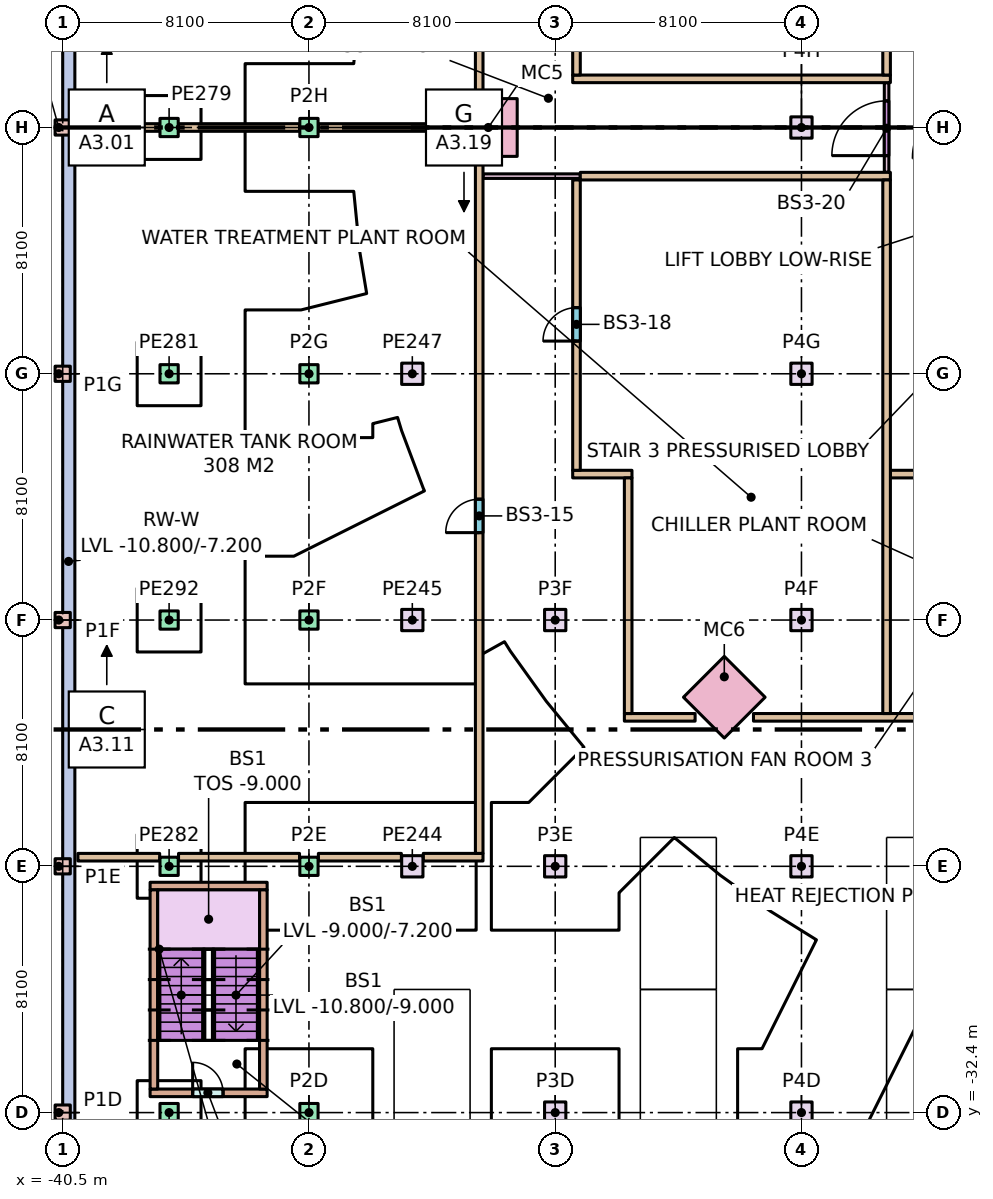
"""IFC4 building model, lengths in metres.
Left out: names, types, materials, properties, quantities, classifications, styles, units other than length and angle.
Written with IfcOpenShell. Run it as: python <this file> out.ifc"""

import sys

from ifc_helpers import new_model, si_unit, direction, frame, frame_2d, origin, origin_2d, place, context, subcontext, project, spatial, rectangle, extrude, element, fill, save


model = new_model("IFC4")
c1 = context("Model", 3, precision=1e-05, world=origin(), true_north=direction((0.0, 1.0)))
c2 = subcontext(c1, "Body", "Model", "MODEL_VIEW")
j1 = project(units=[si_unit("LENGTHUNIT", "METRE"), si_unit("PLANEANGLEUNIT", "RADIAN")], contexts=[c1])
p1 = place(None, origin())
s1 = spatial("IfcSite", under=j1, at=p1, CompositionType="ELEMENT")
p2 = place(p1, origin())
s2 = spatial("IfcBuilding", under=s1, at=p2, CompositionType="ELEMENT")
p3 = place(p2, frame((0.0, 0.0, -10.8)))
s3 = spatial("IfcBuildingStorey", under=s2, at=p3, CompositionType="ELEMENT", Elevation=-10.8)
p4 = place(p3, frame((-40.3, -56.3, 0.0), z_axis=(0.0, 0.0, 1.0), x_axis=(0.0, 1.0, 0.0)))
e1 = element("IfcWall", 1, at=p4, inside=s3, PredefinedType="SOLIDWALL", context=c2, shape_type="SweptSolid", body=[
    extrude(rectangle(XDim=112.6, YDim=0.4, at=frame_2d((56.3, 0.0))), origin(), (0.0, 0.0, 1.0), 3.6),
])
for number, where, z_axis, x_axis in (
    (2, (-40.5, -32.4, 0.0), (0.0, 0.0, 1.0), (1.0, 0.0, 0.0)),
    (3, (-40.5, -24.3, 0.0), (0.0, 0.0, 1.0), (1.0, 0.0, 0.0)),
    (4, (-40.5, -16.2, 0.0), (0.0, 0.0, 1.0), (1.0, 0.0, 0.0)),
    (5, (-40.5, -8.1, 0.0), (0.0, 0.0, 1.0), (1.0, 0.0, 0.0)),
    (6, (-40.5, 0.0, 0.0), (0.0, 0.0, 1.0), (1.0, 0.0, 0.0)),
):
    element("IfcColumn", number, at=place(p3, frame(where, z_axis=z_axis, x_axis=x_axis)), inside=s3, PredefinedType="COLUMN", context=c2, shape_type="SweptSolid", body=[
        extrude(rectangle(XDim=0.5, YDim=0.5, at=origin_2d()), origin(), (0.0, 0.0, 1.0), 3.6),
    ])
for number, where, z_axis, x_axis in (
    (7, (-32.4, -32.4, 0.0), (0.0, 0.0, 1.0), (1.0, 0.0, 0.0)),
    (8, (-32.4, -24.3, 0.0), (0.0, 0.0, 1.0), (1.0, 0.0, 0.0)),
    (9, (-32.4, -16.2, 0.0), (0.0, 0.0, 1.0), (1.0, 0.0, 0.0)),
    (10, (-32.4, -8.1, 0.0), (0.0, 0.0, 1.0), (1.0, 0.0, 0.0)),
    (11, (-32.4, 0.0, 0.0), (0.0, 0.0, 1.0), (1.0, 0.0, 0.0)),
):
    element("IfcColumn", number, at=place(p3, frame(where, z_axis=z_axis, x_axis=x_axis)), inside=s3, PredefinedType="COLUMN", context=c2, shape_type="SweptSolid", body=[
        extrude(rectangle(XDim=0.6, YDim=0.6, at=origin_2d()), origin(), (0.0, 0.0, 1.0), 3.6),
    ])
for number, where, z_axis, x_axis in (
    (12, (-24.3, -32.4, 0.0), (0.0, 0.0, 1.0), (1.0, 0.0, 0.0)),
    (13, (-24.3, -24.3, 0.0), (0.0, 0.0, 1.0), (1.0, 0.0, 0.0)),
    (14, (-24.3, -16.2, 0.0), (0.0, 0.0, 1.0), (1.0, 0.0, 0.0)),
    (15, (-16.2, -32.4, 0.0), (0.0, 0.0, 1.0), (1.0, 0.0, 0.0)),
    (16, (-16.2, -24.3, 0.0), (0.0, 0.0, 1.0), (1.0, 0.0, 0.0)),
    (17, (-16.2, -16.2, 0.0), (0.0, 0.0, 1.0), (1.0, 0.0, 0.0)),
    (18, (-16.2, -8.1, 0.0), (0.0, 0.0, 1.0), (1.0, 0.0, 0.0)),
    (19, (-16.2, 0.0, 0.0), (0.0, 0.0, 1.0), (1.0, 0.0, 0.0)),
    (20, (-29.0, -24.3, 0.0), (0.0, 0.0, 1.0), (1.0, 0.0, 0.0)),
    (21, (-29.0, -16.2, 0.0), (0.0, 0.0, 1.0), (1.0, 0.0, 0.0)),
    (22, (-29.0, -8.1, 0.0), (0.0, 0.0, 1.0), (1.0, 0.0, 0.0)),
):
    element("IfcColumn", number, at=place(p3, frame(where, z_axis=z_axis, x_axis=x_axis)), inside=s3, PredefinedType="COLUMN", context=c2, shape_type="SweptSolid", body=[
        extrude(rectangle(XDim=0.7, YDim=0.7, at=origin_2d()), origin(), (0.0, 0.0, 1.0), 3.6),
    ])
for number, where, z_axis, x_axis in (
    (23, (-37.0, 0.0, 0.0), (0.0, 0.0, 1.0), (1.0, 0.0, 0.0)),
    (24, (-37.0, -32.4, 0.0), (0.0, 0.0, 1.0), (1.0, 0.0, 0.0)),
    (25, (-37.0, -8.1, 0.0), (0.0, 0.0, 1.0), (1.0, 0.0, 0.0)),
    (26, (-37.0, -24.3, 0.0), (0.0, 0.0, 1.0), (1.0, 0.0, 0.0)),
    (27, (-37.0, -16.2, 0.0), (0.0, 0.0, 1.0), (1.0, 0.0, 0.0)),
):
    element("IfcColumn", number, at=place(p3, frame(where, z_axis=z_axis, x_axis=x_axis)), inside=s3, PredefinedType="COLUMN", context=c2, shape_type="SweptSolid", body=[
        extrude(rectangle(XDim=0.6, YDim=0.6, at=origin_2d()), origin(), (0.0, 0.0, 1.0), 3.6),
    ])
for number, where, z_axis, x_axis in (
    (28, (-26.5, 0.0, 0.0), (0.0, 0.0, 1.0), (0.0, -1.0, 0.0)),
    (29, (-18.738, -18.738, 0.0), (0.0, 0.0, 1.0), (0.707, -0.707, 0.0)),
):
    element("IfcColumn", number, at=place(p3, frame(where, z_axis=z_axis, x_axis=x_axis)), inside=s3, PredefinedType="COLUMN", context=c2, shape_type="SweptSolid", body=[
        extrude(rectangle(XDim=1.9, YDim=1.9, at=origin_2d()), origin(), (0.0, 0.0, 1.0), 3.6),
    ])
p5 = place(p3, frame((-37.625, -31.75, 0.0), z_axis=(0.0, 0.0, 1.0), x_axis=(1.0, 0.0, 0.0)))
e30 = element("IfcWall", 30, at=p5, inside=s3, PredefinedType="STANDARD", context=c2, shape_type="SweptSolid", body=[
    extrude(rectangle(XDim=3.85, YDim=0.25, at=frame_2d((1.925, 0.0))), origin(), (0.0, 0.0, 1.0), 3.28),
])
p6 = place(p5, frame((1.4, 0.0, 0.0)))
e31 = element("IfcOpeningElement", 31, at=p6, cuts=e30, PredefinedType="OPENING", context=c2, shape_type="SweptSolid", body=[
    extrude(rectangle(XDim=1.0, YDim=2.1, at=frame_2d((0.5, 1.05))), frame((0.0, 0.135, 0.0), z_axis=(0.0, -1.0, 0.0), x_axis=(1.0, 0.0, 0.0)), (0.0, 0.0, 1.0), 0.27),
])
p7 = place(p3, frame((-37.625, -24.95, 0.0), z_axis=(0.0, 0.0, 1.0), x_axis=(1.0, 0.0, 0.0)))
e32 = element("IfcWall", 32, at=p7, inside=s3, PredefinedType="STANDARD", context=c2, shape_type="SweptSolid", body=[
    extrude(rectangle(XDim=3.85, YDim=0.25, at=frame_2d((1.925, 0.0))), origin(), (0.0, 0.0, 1.0), 3.28),
])
for number, where, z_axis, x_axis in (
    (33, (-37.5, -31.625, 0.0), (0.0, 0.0, 1.0), (0.0, 1.0, 0.0)),
    (34, (-33.9, -31.625, 0.0), (0.0, 0.0, 1.0), (0.0, 1.0, 0.0)),
):
    element("IfcWall", number, at=place(p3, frame(where, z_axis=z_axis, x_axis=x_axis)), inside=s3, PredefinedType="STANDARD", context=c2, shape_type="SweptSolid", body=[
        extrude(rectangle(XDim=6.55, YDim=0.25, at=frame_2d((3.275, 0.0))), origin(), (0.0, 0.0, 1.0), 3.28),
    ])
p8 = place(p3, frame((-26.675, -1.6, 0.0), z_axis=(0.0, 0.0, 1.0), x_axis=(1.0, 0.0, 0.0)))
e35 = element("IfcWall", 35, at=p8, inside=s3, PredefinedType="PARTITIONING", context=c2, shape_type="SweptSolid", body=[
    extrude(rectangle(XDim=3.2, YDim=0.15, at=frame_2d((1.6, 0.0))), origin(), (0.0, 0.0, 1.0), 3.28),
])
p9 = place(p3, frame((-40.0, -24.0, 0.0), z_axis=(0.0, 0.0, 1.0), x_axis=(1.0, 0.0, 0.0)))
e36 = element("IfcWall", 36, at=p9, inside=s3, PredefinedType="PARTITIONING", context=c2, shape_type="SweptSolid", body=[
    extrude(rectangle(XDim=2.69, YDim=0.25, at=frame_2d((1.345, 0.0))), origin(), (0.0, 0.0, 1.0), 3.28),
])
p10 = place(p3, frame((-36.69, -24.0, 0.0), z_axis=(0.0, 0.0, 1.0), x_axis=(1.0, 0.0, 0.0)))
e37 = element("IfcWall", 37, at=p10, inside=s3, PredefinedType="PARTITIONING", context=c2, shape_type="SweptSolid", body=[
    extrude(rectangle(XDim=3.98, YDim=0.25, at=frame_2d((1.99, 0.0))), origin(), (0.0, 0.0, 1.0), 3.28),
])
p11 = place(p3, frame((-32.09, -24.0, 0.0), z_axis=(0.0, 0.0, 1.0), x_axis=(1.0, 0.0, 0.0)))
e38 = element("IfcWall", 38, at=p11, inside=s3, PredefinedType="PARTITIONING", context=c2, shape_type="SweptSolid", body=[
    extrude(rectangle(XDim=2.73, YDim=0.25, at=frame_2d((1.365, 0.0))), origin(), (0.0, 0.0, 1.0), 3.28),
])
p12 = place(p3, frame((-28.64, -24.0, 0.0), z_axis=(0.0, 0.0, 1.0), x_axis=(1.0, 0.0, 0.0)))
e39 = element("IfcWall", 39, at=p12, inside=s3, PredefinedType="PARTITIONING", context=c2, shape_type="SweptSolid", body=[
    extrude(rectangle(XDim=1.965, YDim=0.25, at=frame_2d((0.982, 0.0))), origin(), (0.0, 0.0, 1.0), 3.28),
])
p13 = place(p3, frame((-26.8, -23.875, 0.0), z_axis=(0.0, 0.0, 1.0), x_axis=(0.0, 1.0, 0.0)))
e40 = element("IfcWall", 40, at=p13, inside=s3, PredefinedType="PARTITIONING", context=c2, shape_type="SweptSolid", body=[
    extrude(rectangle(XDim=22.915, YDim=0.25, at=frame_2d((11.458, 0.0))), origin(), (0.0, 0.0, 1.0), 3.28),
])
p14 = place(p13, frame((10.55, 0.0, 0.0)))
e41 = element("IfcOpeningElement", 41, at=p14, cuts=e40, PredefinedType="OPENING", context=c2, shape_type="SweptSolid", body=[
    extrude(rectangle(XDim=1.1, YDim=2.1, at=frame_2d((0.55, 1.05))), frame((0.0, 0.135, 0.0), z_axis=(0.0, -1.0, 0.0), x_axis=(1.0, 0.0, 0.0)), (0.0, 0.0, 1.0), 0.27),
])
p15 = place(p3, frame((-22.025, -19.4, 0.0), z_axis=(0.0, 0.0, 1.0), x_axis=(1.0, 0.0, 0.0)))
e42 = element("IfcWall", 42, at=p15, inside=s3, PredefinedType="PARTITIONING", context=c2, shape_type="SweptSolid", body=[
    extrude(rectangle(XDim=2.327, YDim=0.25, at=frame_2d((1.163, 0.0))), origin(), (0.0, 0.0, 1.0), 3.28),
])
p16 = place(p3, frame((-17.778, -19.4, 0.0), z_axis=(0.0, 0.0, 1.0), x_axis=(1.0, 0.0, 0.0)))
e43 = element("IfcWall", 43, at=p16, inside=s3, PredefinedType="PARTITIONING", context=c2, shape_type="SweptSolid", body=[
    extrude(rectangle(XDim=35.557, YDim=0.25, at=frame_2d((17.778, 0.0))), origin(), (0.0, 0.0, 1.0), 3.28),
])
p17 = place(p16, frame((9.353, 0.0, 0.0)))
e44 = element("IfcOpeningElement", 44, at=p17, cuts=e43, PredefinedType="OPENING", context=c2, shape_type="SweptSolid", body=[
    extrude(rectangle(XDim=1.1, YDim=2.1, at=frame_2d((0.55, 1.05))), frame((0.0, 0.135, 0.0), z_axis=(0.0, -1.0, 0.0), x_axis=(1.0, 0.0, 0.0)), (0.0, 0.0, 1.0), 0.27),
])
p18 = place(p16, frame((17.373, 0.0, 0.0)))
e45 = element("IfcOpeningElement", 45, at=p18, cuts=e43, PredefinedType="OPENING", context=c2, shape_type="SweptSolid", body=[
    extrude(rectangle(XDim=1.1, YDim=2.1, at=frame_2d((0.55, 1.05))), frame((0.0, 0.135, 0.0), z_axis=(0.0, -1.0, 0.0), x_axis=(1.0, 0.0, 0.0)), (0.0, 0.0, 1.0), 0.27),
])
p19 = place(p16, frame((23.633, 0.0, 0.0)))
e46 = element("IfcOpeningElement", 46, at=p19, cuts=e43, PredefinedType="OPENING", context=c2, shape_type="SweptSolid", body=[
    extrude(rectangle(XDim=1.1, YDim=2.1, at=frame_2d((0.55, 1.05))), frame((0.0, 0.135, 0.0), z_axis=(0.0, -1.0, 0.0), x_axis=(1.0, 0.0, 0.0)), (0.0, 0.0, 1.0), 0.27),
])
p20 = place(p16, frame((31.08, 0.0, 0.0)))
e47 = element("IfcOpeningElement", 47, at=p20, cuts=e43, PredefinedType="OPENING", context=c2, shape_type="SweptSolid", body=[
    extrude(rectangle(XDim=1.1, YDim=2.1, at=frame_2d((0.55, 1.05))), frame((0.0, 0.135, 0.0), z_axis=(0.0, -1.0, 0.0), x_axis=(1.0, 0.0, 0.0)), (0.0, 0.0, 1.0), 0.27),
])
p21 = place(p3, frame((-23.725, -11.4, 0.0), z_axis=(0.0, 0.0, 1.0), x_axis=(1.0, 0.0, 0.0)))
e48 = element("IfcWall", 48, at=p21, inside=s3, PredefinedType="PARTITIONING", context=c2, shape_type="SweptSolid", body=[
    extrude(rectangle(XDim=1.95, YDim=0.25, at=frame_2d((0.975, 0.0))), origin(), (0.0, 0.0, 1.0), 3.28),
])
p22 = place(p3, frame((-23.6, -11.275, 0.0), z_axis=(0.0, 0.0, 1.0), x_axis=(0.0, 1.0, 0.0)))
e49 = element("IfcWall", 49, at=p22, inside=s3, PredefinedType="PARTITIONING", context=c2, shape_type="SweptSolid", body=[
    extrude(rectangle(XDim=9.55, YDim=0.25, at=frame_2d((4.775, 0.0))), origin(), (0.0, 0.0, 1.0), 3.28),
])
p23 = place(p22, frame((4.25, 0.0, 0.0)))
e50 = element("IfcOpeningElement", 50, at=p23, cuts=e49, PredefinedType="OPENING", context=c2, shape_type="SweptSolid", body=[
    extrude(rectangle(XDim=1.1, YDim=2.1, at=frame_2d((0.55, 1.05))), frame((0.0, 0.135, 0.0), z_axis=(0.0, -1.0, 0.0), x_axis=(1.0, 0.0, 0.0)), (0.0, 0.0, 1.0), 0.27),
])
p24 = place(p3, frame((-21.9, -19.275, 0.0), z_axis=(0.0, 0.0, 1.0), x_axis=(0.0, 1.0, 0.0)))
e51 = element("IfcWall", 51, at=p24, inside=s3, PredefinedType="PARTITIONING", context=c2, shape_type="SweptSolid", body=[
    extrude(rectangle(XDim=7.75, YDim=0.25, at=frame_2d((3.875, 0.0))), origin(), (0.0, 0.0, 1.0), 3.28),
])
p25 = place(p3, frame((-13.4, -1.475, 0.0), z_axis=(0.0, 0.0, 1.0), x_axis=(0.0, 1.0, 0.0)))
e52 = element("IfcWall", 52, at=p25, inside=s3, PredefinedType="PARTITIONING", context=c2, shape_type="SweptSolid", body=[
    extrude(rectangle(XDim=2.95, YDim=0.15, at=frame_2d((1.475, 0.0))), origin(), (0.0, 0.0, 1.0), 3.28),
])
p26 = place(p25, frame((0.55, 0.0, 0.0)))
e53 = element("IfcOpeningElement", 53, at=p26, cuts=e52, PredefinedType="OPENING", context=c2, shape_type="SweptSolid", body=[
    extrude(rectangle(XDim=1.8, YDim=2.4, at=frame_2d((0.9, 1.2))), frame((0.0, 0.085, 0.0), z_axis=(0.0, -1.0, 0.0), x_axis=(1.0, 0.0, 0.0)), (0.0, 0.0, 1.0), 0.17),
])
p27 = place(p3, frame((-26.8, 0.96, 0.0), z_axis=(0.0, 0.0, 1.0), x_axis=(0.0, 1.0, 0.0)))
e54 = element("IfcWall", 54, at=p27, inside=s3, PredefinedType="PARTITIONING", context=c2, shape_type="SweptSolid", body=[
    extrude(rectangle(XDim=22.915, YDim=0.25, at=frame_2d((11.458, 0.0))), origin(), (0.0, 0.0, 1.0), 3.28),
])
p28 = place(p27, frame((11.19, 0.0, 0.0)))
e55 = element("IfcOpeningElement", 55, at=p28, cuts=e54, PredefinedType="OPENING", context=c2, shape_type="SweptSolid", body=[
    extrude(rectangle(XDim=1.1, YDim=2.1, at=frame_2d((0.55, 1.05))), frame((0.0, 0.135, 0.0), z_axis=(0.0, -1.0, 0.0), x_axis=(1.0, 0.0, 0.0)), (0.0, 0.0, 1.0), 0.27),
])
p29 = place(p3, frame((-23.725, 1.6, 0.0), z_axis=(0.0, 0.0, 1.0), x_axis=(1.0, 0.0, 0.0)))
e56 = element("IfcWall", 56, at=p29, inside=s3, PredefinedType="PARTITIONING", context=c2, shape_type="SweptSolid", body=[
    extrude(rectangle(XDim=10.45, YDim=0.25, at=frame_2d((5.225, 0.0))), origin(), (0.0, 0.0, 1.0), 3.28),
])
p30 = place(p3, frame((-23.475, -1.6, 0.0), z_axis=(0.0, 0.0, 1.0), x_axis=(1.0, 0.0, 0.0)))
e57 = element("IfcWall", 57, at=p30, inside=s3, PredefinedType="PARTITIONING", context=c2, shape_type="SweptSolid", body=[
    extrude(rectangle(XDim=10.2, YDim=0.25, at=frame_2d((5.1, 0.0))), origin(), (0.0, 0.0, 1.0), 3.28),
])
p31 = place(p3, frame((-23.6, 1.725, 0.0), z_axis=(0.0, 0.0, 1.0), x_axis=(0.0, 1.0, 0.0)))
e58 = element("IfcWall", 58, at=p31, inside=s3, PredefinedType="PARTITIONING", context=c2, shape_type="SweptSolid", body=[
    extrude(rectangle(XDim=9.55, YDim=0.25, at=frame_2d((4.775, 0.0))), origin(), (0.0, 0.0, 1.0), 3.28),
])
p32 = place(p3, frame((-13.275, -11.4, 0.0), z_axis=(0.0, 0.0, 1.0), x_axis=(1.0, 0.0, 0.0)))
e59 = element("IfcWall", 59, at=p32, inside=s3, PredefinedType="PARTITIONING", context=c2, shape_type="SweptSolid", body=[
    extrude(rectangle(XDim=34.55, YDim=0.25, at=frame_2d((17.275, 0.0))), origin(), (0.0, 0.0, 1.0), 3.28),
])
for number, where, z_axis, x_axis in (
    (60, (-13.4, 1.725, 0.0), (0.0, 0.0, 1.0), (0.0, 1.0, 0.0)),
    (61, (-13.4, -19.275, 0.0), (0.0, 0.0, 1.0), (0.0, 1.0, 0.0)),
):
    element("IfcWall", number, at=place(p3, frame(where, z_axis=z_axis, x_axis=x_axis)), inside=s3, PredefinedType="PARTITIONING", context=c2, shape_type="SweptSolid", body=[
        extrude(rectangle(XDim=17.55, YDim=0.25, at=frame_2d((8.775, 0.0))), origin(), (0.0, 0.0, 1.0), 3.28),
    ])
p33 = place(p3, frame((-40.0, 0.0, 0.0), z_axis=(0.0, 0.0, 1.0), x_axis=(1.0, 0.0, 0.0)))
e62 = element("IfcWall", 62, at=p33, inside=s3, PredefinedType="PARTITIONING", context=c2, shape_type="SweptSolid", body=[
    extrude(rectangle(XDim=2.69, YDim=0.25, at=frame_2d((1.345, 0.0))), origin(), (0.0, 0.0, 1.0), 3.28),
])
p34 = place(p3, frame((-36.69, 0.0, 0.0), z_axis=(0.0, 0.0, 1.0), x_axis=(1.0, 0.0, 0.0)))
e63 = element("IfcWall", 63, at=p34, inside=s3, PredefinedType="PARTITIONING", context=c2, shape_type="SweptSolid", body=[
    extrude(rectangle(XDim=3.98, YDim=0.25, at=frame_2d((1.99, 0.0))), origin(), (0.0, 0.0, 1.0), 3.28),
])
p35 = place(p3, frame((-32.09, 0.0, 0.0), z_axis=(0.0, 0.0, 1.0), x_axis=(1.0, 0.0, 0.0)))
e64 = element("IfcWall", 64, at=p35, inside=s3, PredefinedType="PARTITIONING", context=c2, shape_type="SweptSolid", body=[
    extrude(rectangle(XDim=4.63, YDim=0.25, at=frame_2d((2.315, 0.0))), origin(), (0.0, 0.0, 1.0), 3.28),
])
p36 = place(p6, origin())
e65 = element("IfcDoor", 65, at=p36, inside=s3, OperationType="SINGLE_SWING_LEFT", PredefinedType="DOOR", context=c2, shape_type="SweptSolid", body=[
    extrude(rectangle(XDim=1.0, YDim=2.1, at=frame_2d((0.5, 1.05))), frame((0.0, 0.025, 0.0), z_axis=(0.0, -1.0, 0.0), x_axis=(1.0, 0.0, 0.0)), (0.0, 0.0, 1.0), 0.05),
])
fill(e31, e65)
p37 = place(p14, origin())
e66 = element("IfcDoor", 66, at=p37, inside=s3, OperationType="SINGLE_SWING_LEFT", PredefinedType="DOOR", context=c2, shape_type="SweptSolid", body=[
    extrude(rectangle(XDim=1.1, YDim=2.1, at=frame_2d((0.55, 1.05))), frame((0.0, 0.025, 0.0), z_axis=(0.0, -1.0, 0.0), x_axis=(1.0, 0.0, 0.0)), (0.0, 0.0, 1.0), 0.05),
])
fill(e41, e66)
p38 = place(p23, origin())
e67 = element("IfcDoor", 67, at=p38, inside=s3, OperationType="SINGLE_SWING_LEFT", PredefinedType="DOOR", context=c2, shape_type="SweptSolid", body=[
    extrude(rectangle(XDim=1.1, YDim=2.1, at=frame_2d((0.55, 1.05))), frame((0.0, 0.025, 0.0), z_axis=(0.0, -1.0, 0.0), x_axis=(1.0, 0.0, 0.0)), (0.0, 0.0, 1.0), 0.05),
])
fill(e50, e67)
p39 = place(p26, origin())
e68 = element("IfcDoor", 68, at=p39, inside=s3, OperationType="SINGLE_SWING_LEFT", PredefinedType="DOOR", context=c2, shape_type="SweptSolid", body=[
    extrude(rectangle(XDim=1.8, YDim=2.4, at=frame_2d((0.9, 1.2))), frame((0.0, 0.025, 0.0), z_axis=(0.0, -1.0, 0.0), x_axis=(1.0, 0.0, 0.0)), (0.0, 0.0, 1.0), 0.05),
])
fill(e53, e68)
save(model, sys.argv[1])
